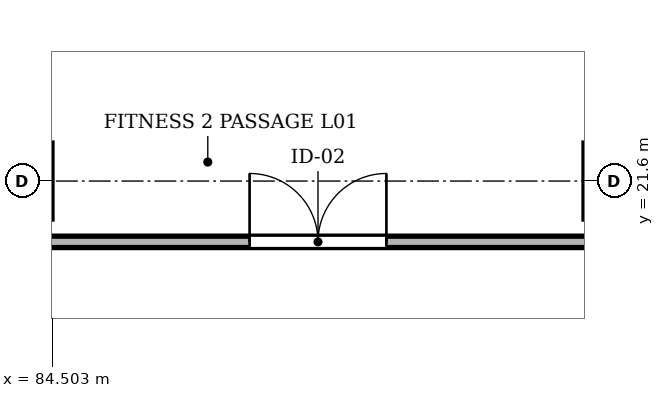
"""IFC4 building model, lengths in metres.
Left out: names, types, materials, properties, quantities, classifications, styles, units other than length and angle.
Written with IfcOpenShell. Run it as: python <this file> out.ifc"""

import sys

from ifc_helpers import new_model, si_unit, direction, frame, frame_2d, origin, place, context, subcontext, project, spatial, rectangle, extrude, element, fill, save


model = new_model("IFC4")
c1 = context("Model", 3, precision=1e-05, world=origin(), true_north=direction((0.0, 1.0)))
c2 = subcontext(c1, "Body", "Model", "MODEL_VIEW")
j1 = project(units=[si_unit("LENGTHUNIT", "METRE"), si_unit("PLANEANGLEUNIT", "RADIAN")], contexts=[c1])
p1 = place(None, origin())
s1 = spatial("IfcSite", under=j1, at=p1, CompositionType="ELEMENT")
p2 = place(p1, origin())
s2 = spatial("IfcBuilding", under=s1, at=p2, CompositionType="ELEMENT")
p3 = place(p2, frame((0.0, 0.0, 4.6)))
s3 = spatial("IfcBuildingStorey", under=s2, at=p3, CompositionType="ELEMENT", Elevation=4.6)
p4 = place(p3, frame((76.8, 20.8, 0.0), z_axis=(0.0, 0.0, 1.0), x_axis=(1.0, 0.0, 0.0)))
e1 = element("IfcWall", 1, at=p4, inside=s3, PredefinedType="PARTITIONING", context=c2, shape_type="SweptSolid", body=[
    extrude(rectangle(XDim=30.4, YDim=0.15, at=frame_2d((15.2, 0.0))), origin(), (0.0, 0.0, 1.0), 4.08),
])
p5 = place(p4, frame((10.3, 0.0, 0.0)))
e2 = element("IfcOpeningElement", 2, at=p5, cuts=e1, PredefinedType="OPENING", context=c2, shape_type="SweptSolid", body=[
    extrude(rectangle(XDim=1.8, YDim=2.25, at=frame_2d((0.9, 1.125))), frame((0.0, 0.087, 0.0), z_axis=(0.0, -1.0, 0.0), x_axis=(1.0, 0.0, 0.0)), (0.0, 0.0, 1.0), 0.174),
])
p6 = place(p5, origin())
e3 = element("IfcDoor", 3, at=p6, inside=s3, OperationType="DOUBLE_DOOR_SINGLE_SWING", PredefinedType="DOOR", context=c2, shape_type="SweptSolid", body=[
    extrude(rectangle(XDim=1.8, YDim=2.25, at=frame_2d((0.9, 1.125))), frame((0.0, 0.025, 0.0), z_axis=(0.0, -1.0, 0.0), x_axis=(1.0, 0.0, 0.0)), (0.0, 0.0, 1.0), 0.05),
])
fill(e2, e3)
save(model, sys.argv[1])
